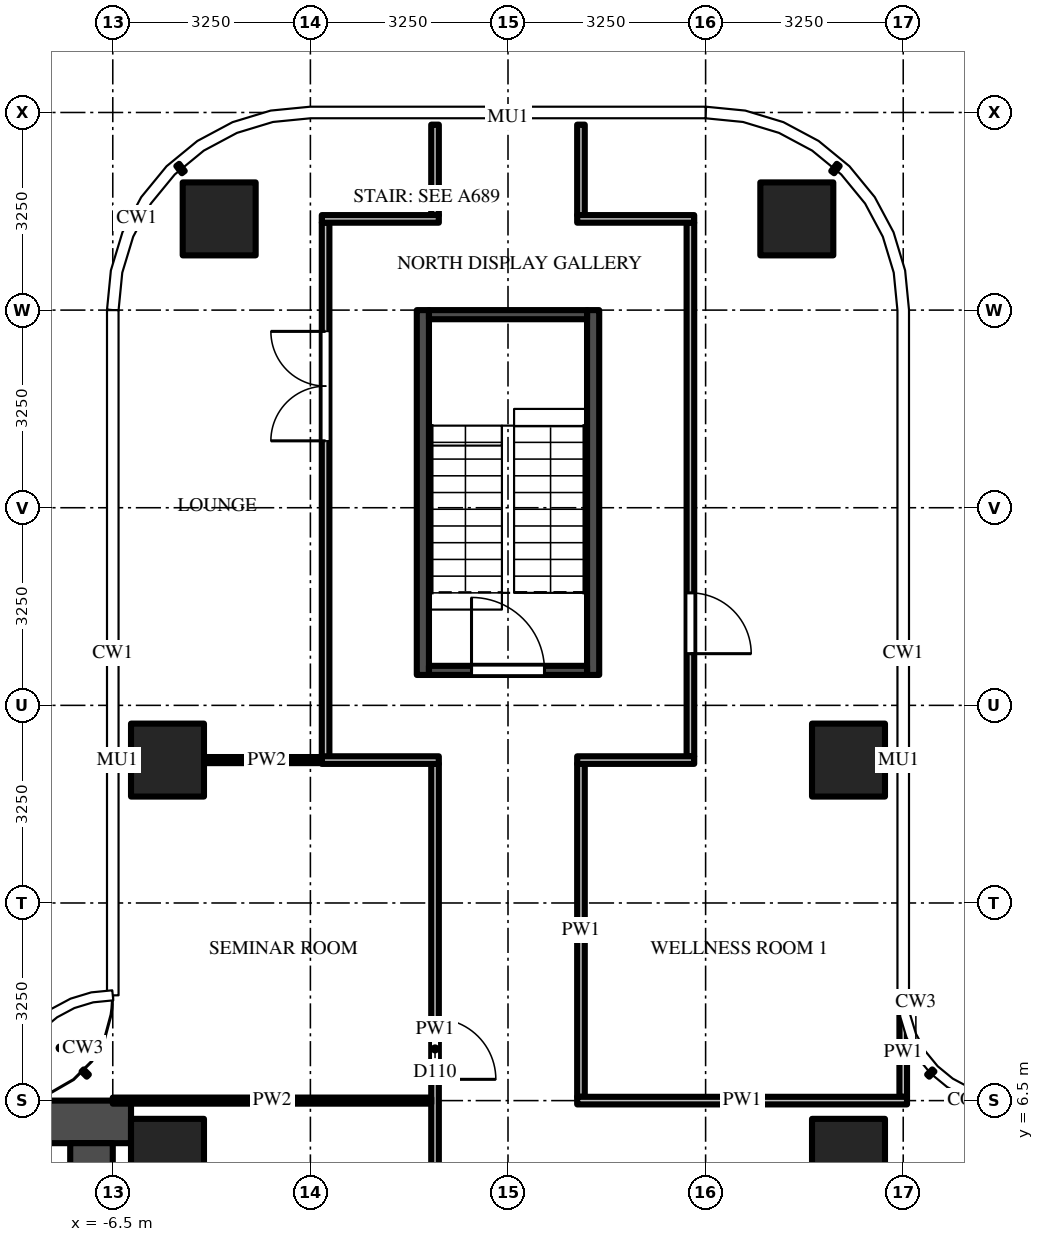
"""IFC4 building model, lengths in metres.
Left out: names, types, materials, properties, quantities, classifications, styles, units other than length and angle.
Written with IfcOpenShell. Run it as: python <this file> out.ifc"""

import sys

from ifc_helpers import new_model, si_unit, direction, frame, frame_2d, origin, origin_2d, place, context, subcontext, project, spatial, rectangle, extrude, source, transform, mapped, element, fill, save


model = new_model("IFC4")
c1 = context("Model", 3, precision=1e-05, world=origin(), true_north=direction((0.0, 1.0)))
c2 = subcontext(c1, "Body", "Model", "MODEL_VIEW")
j1 = project(units=[si_unit("LENGTHUNIT", "METRE"), si_unit("PLANEANGLEUNIT", "RADIAN")], contexts=[c1])
p1 = place(None, origin())
s1 = spatial("IfcSite", under=j1, at=p1, CompositionType="ELEMENT")
p2 = place(p1, origin())
s2 = spatial("IfcBuilding", under=s1, at=p2, CompositionType="ELEMENT")
p3 = place(p2, frame((0.0, 0.0, 204.9)))
s3 = spatial("IfcBuildingStorey", under=s2, at=p3, CompositionType="ELEMENT", Elevation=204.9)
m1 = source(origin(), c2, "Body", "SweptSolid", [
    extrude(rectangle(XDim=1.2, YDim=1.2, at=origin_2d()), origin(), (0.0, 0.0, 1.0), 3.9),
])
for number, where, z_axis, x_axis in (
    (1, (-5.6, 12.1, 0.0), (0.0, 0.0, 1.0), (1.0, 0.0, 0.0)),
    (2, (-4.75, 21.0, 0.0), (0.0, 0.0, 1.0), (1.0, 0.0, 0.0)),
    (3, (5.6, 12.1, 0.0), (0.0, 0.0, 1.0), (1.0, 0.0, 0.0)),
    (4, (4.75, 21.0, 0.0), (0.0, 0.0, 1.0), (1.0, 0.0, 0.0)),
    (5, (5.6, 5.6, 0.0), (0.0, 0.0, 1.0), (1.0, 0.0, 0.0)),
    (6, (-5.6, 5.6, 0.0), (0.0, 0.0, 1.0), (1.0, 0.0, 0.0)),
):
    element("IfcColumn", number, at=place(p3, frame(where, z_axis=z_axis, x_axis=x_axis)), inside=s3, PredefinedType="COLUMN", context=c2, shape_type="MappedRepresentation", body=[
        mapped(m1, transform((0.0, 0.0, 0.0))),
    ])
m2 = source(origin(), c2, "Body", "SweptSolid", [
    extrude(rectangle(XDim=16.55, YDim=0.7, at=frame_2d((8.275, 0.0))), origin(), (0.0, 0.0, 1.0), 3.7),
])
p4 = place(p3, frame((-6.2, 6.15, 0.0), z_axis=(0.0, 0.0, 1.0), x_axis=(-1.0, 0.0, 0.0)))
e7 = element("IfcWall", 7, at=p4, inside=s3, PredefinedType="SHEAR", context=c2, shape_type="MappedRepresentation", body=[
    mapped(m2, transform((0.0, 0.0, 0.0))),
])
m3 = source(origin(), c2, "Body", "SweptSolid", [
    extrude(rectangle(XDim=9.05, YDim=0.7, at=frame_2d((4.525, 0.0))), origin(), (0.0, 0.0, 1.0), 3.7),
])
p5 = place(p3, frame((-6.85, 5.8, 0.0), z_axis=(0.0, 0.0, 1.0), x_axis=(0.0, -1.0, 0.0)))
e8 = element("IfcWall", 8, at=p5, inside=s3, PredefinedType="SHEAR", context=c2, shape_type="MappedRepresentation", body=[
    mapped(m3, transform((0.0, 0.0, 0.0))),
])
m4 = source(origin(), c2, "Body", "SweptSolid", [
    extrude(rectangle(XDim=1.8, YDim=2.1, at=frame_2d((0.9, 1.05))), frame((0.0, 0.36, 0.0), z_axis=(0.0, -1.0, 0.0), x_axis=(1.0, 0.0, 0.0)), (0.0, 0.0, 1.0), 0.72),
])
p6 = place(p5, frame((3.15, 0.0, 0.0)))
e9 = element("IfcOpeningElement", 9, at=p6, cuts=e8, PredefinedType="OPENING", context=c2, shape_type="MappedRepresentation", body=[
    mapped(m4, transform((0.0, 0.0, 0.0))),
])
m5 = source(origin(), c2, "Body", "SweptSolid", [
    extrude(rectangle(XDim=6.0, YDim=0.2, at=frame_2d((3.0, 0.0))), origin(), (0.0, 0.0, 1.0), 3.7),
])
for number, where, z_axis, x_axis in (
    (10, (-1.4, 13.5, 0.0), (0.0, 0.0, 1.0), (0.0, 1.0, 0.0)),
    (11, (1.4, 13.5, 0.0), (0.0, 0.0, 1.0), (0.0, 1.0, 0.0)),
):
    element("IfcWall", number, at=place(p3, frame(where, z_axis=z_axis, x_axis=x_axis)), inside=s3, PredefinedType="SHEAR", context=c2, shape_type="MappedRepresentation", body=[
        mapped(m5, transform((0.0, 0.0, 0.0))),
    ])
m6 = source(origin(), c2, "Body", "SweptSolid", [
    extrude(rectangle(XDim=2.6, YDim=0.15, at=frame_2d((1.3, 0.0))), origin(), (0.0, 0.0, 1.0), 3.7),
])
p7 = place(p3, frame((-1.3, 13.575, 0.0), z_axis=(0.0, 0.0, 1.0), x_axis=(1.0, 0.0, 0.0)))
e12 = element("IfcWall", 12, at=p7, inside=s3, PredefinedType="SHEAR", context=c2, shape_type="MappedRepresentation", body=[
    mapped(m6, transform((0.0, 0.0, 0.0))),
])
m7 = source(origin(), c2, "Body", "SweptSolid", [
    extrude(rectangle(XDim=1.2, YDim=2.1, at=frame_2d((0.6, 1.05))), frame((0.0, 0.085, 0.0), z_axis=(0.0, -1.0, 0.0), x_axis=(1.0, 0.0, 0.0)), (0.0, 0.0, 1.0), 0.17),
])
p8 = place(p7, frame((0.7, 0.0, 0.0)))
e13 = element("IfcOpeningElement", 13, at=p8, cuts=e12, PredefinedType="OPENING", context=c2, shape_type="MappedRepresentation", body=[
    mapped(m7, transform((0.0, 0.0, 0.0))),
])
p9 = place(p3, frame((-1.3, 19.425, 0.0), z_axis=(0.0, 0.0, 1.0), x_axis=(1.0, 0.0, 0.0)))
e14 = element("IfcWall", 14, at=p9, inside=s3, PredefinedType="SHEAR", context=c2, shape_type="MappedRepresentation", body=[
    mapped(m6, transform((0.0, 0.0, 0.0))),
])
m8 = source(origin(), c2, "Body", "SweptSolid", [
    extrude(rectangle(XDim=8.788, YDim=0.125, at=frame_2d((4.394, 0.0))), origin(), (0.0, 0.0, 1.0), 2.78),
])
p10 = place(p3, frame((-3.0, 12.15, 0.0), z_axis=(0.0, 0.0, 1.0), x_axis=(0.0, 1.0, 0.0)))
e15 = element("IfcWall", 15, at=p10, inside=s3, PredefinedType="PARTITIONING", context=c2, shape_type="MappedRepresentation", body=[
    mapped(m8, transform((0.0, 0.0, 0.0))),
])
m9 = source(origin(), c2, "Body", "SweptSolid", [
    extrude(rectangle(XDim=1.8, YDim=2.1, at=frame_2d((0.9, 1.05))), frame((0.0, 0.073, 0.0), z_axis=(0.0, -1.0, 0.0), x_axis=(1.0, 0.0, 0.0)), (0.0, 0.0, 1.0), 0.145),
])
p11 = place(p10, frame((5.2, 0.0, 0.0)))
e16 = element("IfcOpeningElement", 16, at=p11, cuts=e15, PredefinedType="OPENING", context=c2, shape_type="MappedRepresentation", body=[
    mapped(m9, transform((0.0, 0.0, 0.0))),
])
m10 = source(origin(), c2, "Body", "SweptSolid", [
    extrude(rectangle(XDim=8.725, YDim=0.125, at=frame_2d((4.363, 0.0))), origin(), (0.0, 0.0, 1.0), 2.997),
])
p12 = place(p3, frame((-1.2, 12.038, 0.0), z_axis=(0.0, 0.0, 1.0), x_axis=(0.0, -1.0, 0.0)))
e17 = element("IfcWall", 17, at=p12, inside=s3, PredefinedType="PARTITIONING", context=c2, shape_type="MappedRepresentation", body=[
    mapped(m10, transform((0.0, 0.0, 0.0))),
])
m11 = source(origin(), c2, "Body", "SweptSolid", [
    extrude(rectangle(XDim=1.0, YDim=2.1, at=frame_2d((0.5, 1.05))), frame((0.0, 0.073, 0.0), z_axis=(0.0, -1.0, 0.0), x_axis=(1.0, 0.0, 0.0)), (0.0, 0.0, 1.0), 0.145),
])
p13 = place(p12, frame((4.188, 0.0, 0.0)))
e18 = element("IfcOpeningElement", 18, at=p13, cuts=e17, PredefinedType="OPENING", context=c2, shape_type="MappedRepresentation", body=[
    mapped(m11, transform((0.0, 0.0, 0.0))),
])
m12 = source(origin(), c2, "Body", "SweptSolid", [
    extrude(rectangle(XDim=1.488, YDim=0.125, at=frame_2d((0.744, 0.0))), origin(), (0.0, 0.0, 1.0), 2.78),
])
p14 = place(p3, frame((-1.2, 22.55, 0.0), z_axis=(0.0, 0.0, 1.0), x_axis=(0.0, -1.0, 0.0)))
e19 = element("IfcWall", 19, at=p14, inside=s3, PredefinedType="PARTITIONING", context=c2, shape_type="MappedRepresentation", body=[
    mapped(m12, transform((0.0, 0.0, 0.0))),
])
m13 = source(origin(), c2, "Body", "SweptSolid", [
    extrude(rectangle(XDim=5.475, YDim=0.125, at=frame_2d((2.738, 0.0))), origin(), (0.0, 0.0, 1.0), 2.997),
])
p15 = place(p3, frame((1.2, 12.038, 0.0), z_axis=(0.0, 0.0, 1.0), x_axis=(0.0, -1.0, 0.0)))
e20 = element("IfcWall", 20, at=p15, inside=s3, PredefinedType="PARTITIONING", context=c2, shape_type="MappedRepresentation", body=[
    mapped(m13, transform((0.0, 0.0, 0.0))),
])
p16 = place(p3, frame((1.2, 22.55, 0.0), z_axis=(0.0, 0.0, 1.0), x_axis=(0.0, -1.0, 0.0)))
e21 = element("IfcWall", 21, at=p16, inside=s3, PredefinedType="PARTITIONING", context=c2, shape_type="MappedRepresentation", body=[
    mapped(m12, transform((0.0, 0.0, 0.0))),
])
m14 = source(origin(), c2, "Body", "SweptSolid", [
    extrude(rectangle(XDim=8.775, YDim=0.125, at=frame_2d((4.387, 0.0))), origin(), (0.0, 0.0, 1.0), 2.78),
])
p17 = place(p3, frame((3.0, 20.938, 0.0), z_axis=(0.0, 0.0, 1.0), x_axis=(0.0, -1.0, 0.0)))
e22 = element("IfcWall", 22, at=p17, inside=s3, PredefinedType="PARTITIONING", context=c2, shape_type="MappedRepresentation", body=[
    mapped(m14, transform((0.0, 0.0, 0.0))),
])
p18 = place(p17, frame((6.087, 0.0, 0.0)))
e23 = element("IfcOpeningElement", 23, at=p18, cuts=e22, PredefinedType="OPENING", context=c2, shape_type="MappedRepresentation", body=[
    mapped(m11, transform((0.0, 0.0, 0.0))),
])
m15 = source(origin(), c2, "Body", "SweptSolid", [
    extrude(rectangle(XDim=1.469, YDim=0.125, at=frame_2d((0.734, 0.0))), origin(), (0.0, 0.0, 1.0), 3.7),
])
p19 = place(p3, frame((6.5, 6.562, 0.0), z_axis=(0.0, 0.0, 1.0), x_axis=(0.0, 1.0, 0.0)))
e24 = element("IfcWall", 24, at=p19, inside=s3, PredefinedType="PARTITIONING", context=c2, shape_type="MappedRepresentation", body=[
    mapped(m15, transform((0.0, 0.0, 0.0))),
])
m16 = source(origin(), c2, "Body", "SweptSolid", [
    extrude(rectangle(XDim=5.238, YDim=0.1, at=frame_2d((2.619, 0.0))), origin(), (0.0, 0.0, 1.0), 2.78),
])
p20 = place(p3, frame((-6.5, 6.5, 0.0), z_axis=(0.0, 0.0, 1.0), x_axis=(1.0, 0.0, 0.0)))
e25 = element("IfcWall", 25, at=p20, inside=s3, PredefinedType="PARTITIONING", context=c2, shape_type="MappedRepresentation", body=[
    mapped(m16, transform((0.0, 0.0, 0.0))),
])
m17 = source(origin(), c2, "Body", "SweptSolid", [
    extrude(rectangle(XDim=5.425, YDim=0.125, at=frame_2d((2.712, 0.0))), origin(), (0.0, 0.0, 1.0), 2.78),
])
p21 = place(p3, frame((1.137, 6.5, 0.0), z_axis=(0.0, 0.0, 1.0), x_axis=(1.0, 0.0, 0.0)))
e26 = element("IfcWall", 26, at=p21, inside=s3, PredefinedType="PARTITIONING", context=c2, shape_type="MappedRepresentation", body=[
    mapped(m17, transform((0.0, 0.0, 0.0))),
])
m18 = source(origin(), c2, "Body", "SweptSolid", [
    extrude(rectangle(XDim=2.062, YDim=0.1, at=frame_2d((1.031, 0.0))), origin(), (0.0, 0.0, 1.0), 2.997),
])
p22 = place(p3, frame((-5.0, 12.1, 0.0), z_axis=(0.0, 0.0, 1.0), x_axis=(1.0, 0.0, 0.0)))
e27 = element("IfcWall", 27, at=p22, inside=s3, PredefinedType="PARTITIONING", context=c2, shape_type="MappedRepresentation", body=[
    mapped(m18, transform((0.0, 0.0, 0.0))),
])
m19 = source(origin(), c2, "Body", "SweptSolid", [
    extrude(rectangle(XDim=1.925, YDim=0.125, at=frame_2d((0.962, 0.0))), origin(), (0.0, 0.0, 1.0), 2.997),
])
for number, where, z_axis, x_axis in (
    (28, (-1.137, 12.1, 0.0), (0.0, 0.0, 1.0), (-1.0, 0.0, 0.0)),
    (29, (3.062, 12.1, 0.0), (0.0, 0.0, 1.0), (-1.0, 0.0, 0.0)),
):
    element("IfcWall", number, at=place(p3, frame(where, z_axis=z_axis, x_axis=x_axis)), inside=s3, PredefinedType="PARTITIONING", context=c2, shape_type="MappedRepresentation", body=[
        mapped(m19, transform((0.0, 0.0, 0.0))),
    ])
m20 = source(origin(), c2, "Body", "SweptSolid", [
    extrude(rectangle(XDim=1.925, YDim=0.125, at=frame_2d((0.962, 0.0))), origin(), (0.0, 0.0, 1.0), 2.78),
])
for number, where, z_axis, x_axis in (
    (30, (-3.062, 21.0, 0.0), (0.0, 0.0, 1.0), (1.0, 0.0, 0.0)),
    (31, (1.137, 21.0, 0.0), (0.0, 0.0, 1.0), (1.0, 0.0, 0.0)),
):
    element("IfcWall", number, at=place(p3, frame(where, z_axis=z_axis, x_axis=x_axis)), inside=s3, PredefinedType="PARTITIONING", context=c2, shape_type="MappedRepresentation", body=[
        mapped(m20, transform((0.0, 0.0, 0.0))),
    ])
m21 = source(origin(), c2, "Body", "SweptSolid", [
    extrude(rectangle(XDim=1.2, YDim=2.1, at=frame_2d((0.6, 1.05))), frame((0.0, 0.025, 0.0), z_axis=(0.0, -1.0, 0.0), x_axis=(1.0, 0.0, 0.0)), (0.0, 0.0, 1.0), 0.05),
])
p23 = place(p8, origin())
e32 = element("IfcDoor", 32, at=p23, inside=s3, OperationType="SINGLE_SWING_LEFT", PredefinedType="DOOR", context=c2, shape_type="MappedRepresentation", body=[
    mapped(m21, transform((0.0, 0.0, 0.0))),
])
fill(e13, e32)
m22 = source(origin(), c2, "Body", "SweptSolid", [
    extrude(rectangle(XDim=1.0, YDim=2.1, at=frame_2d((0.5, 1.05))), frame((0.0, 0.025, 0.0), z_axis=(0.0, -1.0, 0.0), x_axis=(1.0, 0.0, 0.0)), (0.0, 0.0, 1.0), 0.05),
])
p24 = place(p13, origin())
e33 = element("IfcDoor", 33, at=p24, inside=s3, OperationType="SINGLE_SWING_RIGHT", PredefinedType="DOOR", context=c2, shape_type="MappedRepresentation", body=[
    mapped(m22, transform((0.0, 0.0, 0.0))),
])
fill(e18, e33)
p25 = place(p18, origin())
e34 = element("IfcDoor", 34, at=p25, inside=s3, OperationType="SINGLE_SWING_RIGHT", PredefinedType="DOOR", context=c2, shape_type="MappedRepresentation", body=[
    mapped(m22, transform((0.0, 0.0, 0.0))),
])
fill(e23, e34)
m23 = source(origin(), c2, "Body", "SweptSolid", [
    extrude(rectangle(XDim=1.8, YDim=2.1, at=frame_2d((0.9, 1.05))), frame((0.0, 0.025, 0.0), z_axis=(0.0, -1.0, 0.0), x_axis=(1.0, 0.0, 0.0)), (0.0, 0.0, 1.0), 0.05),
])
p26 = place(p11, origin())
e35 = element("IfcDoor", 35, at=p26, inside=s3, OperationType="DOUBLE_DOOR_SINGLE_SWING", PredefinedType="DOOR", context=c2, shape_type="MappedRepresentation", body=[
    mapped(m23, transform((0.0, 0.0, 0.0))),
])
fill(e16, e35)
save(model, sys.argv[1])
